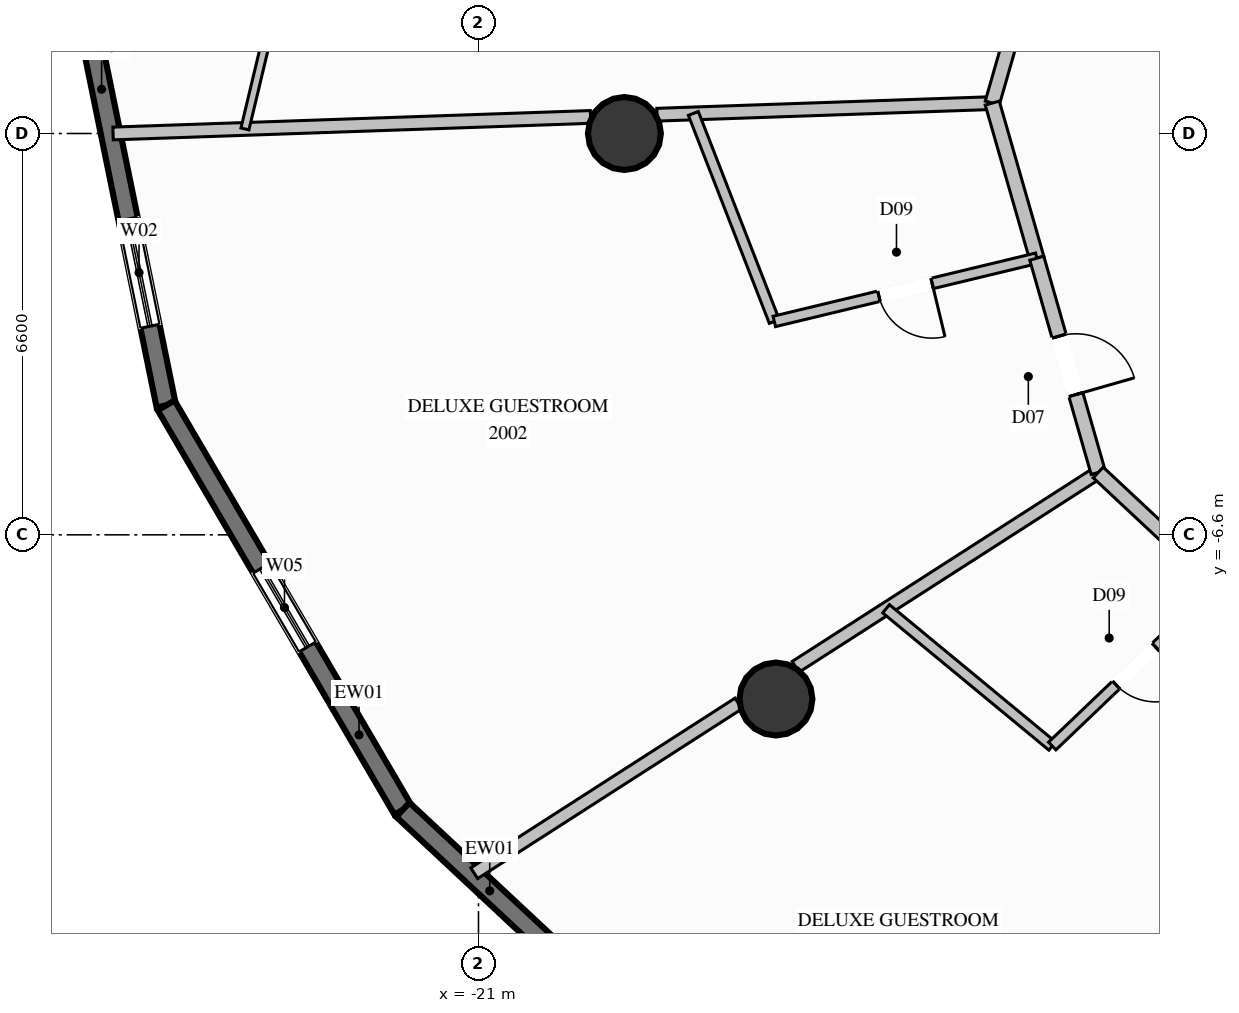
"""IFC4 building model, lengths in metres.
Left out: names, types, materials, properties, quantities, classifications, styles, units other than length and angle.
Written with IfcOpenShell. Run it as: python <this file> out.ifc"""

import sys

from ifc_helpers import new_model, si_unit, direction, frame, frame_2d, origin, origin_2d, place, context, subcontext, project, spatial, rectangle, circle, extrude, element, fill, save


model = new_model("IFC4")
c1 = context("Model", 3, precision=1e-05, world=origin(), true_north=direction((0.0, 1.0)))
c2 = subcontext(c1, "Body", "Model", "MODEL_VIEW")
j1 = project(units=[si_unit("LENGTHUNIT", "METRE"), si_unit("PLANEANGLEUNIT", "RADIAN")], contexts=[c1])
p1 = place(None, origin())
s1 = spatial("IfcSite", under=j1, at=p1, CompositionType="ELEMENT")
p2 = place(p1, origin())
s2 = spatial("IfcBuilding", under=s1, at=p2, CompositionType="ELEMENT")
p3 = place(p2, frame((0.0, 0.0, 75.2)))
s3 = spatial("IfcBuildingStorey", under=s2, at=p3, CompositionType="ELEMENT", Elevation=75.2)
for number, where, z_axis, x_axis in (
    (1, (-18.6, 0.0, 0.0), (0.0, 0.0, 1.0), (1.0, 0.0, 0.0)),
    (2, (-16.108, -9.3, 0.0), (0.0, 0.0, 1.0), (1.0, 0.0, 0.0)),
):
    element("IfcColumn", number, at=place(p3, frame(where, z_axis=z_axis, x_axis=x_axis)), inside=s3, PredefinedType="COLUMN", context=c2, shape_type="SweptSolid", body=[
        extrude(circle(Radius=0.6, at=origin_2d()), origin(), (0.0, 0.0, 1.0), 3.6),
    ])
p4 = place(p3, frame((-26.137, -4.471, 0.0), z_axis=(0.0, 0.0, 1.0), x_axis=(-0.200054576405, 0.979784755168, 0.0)))
e3 = element("IfcWall", 3, at=p4, inside=s3, PredefinedType="SOLIDWALL", context=c2, shape_type="SweptSolid", body=[
    extrude(rectangle(XDim=7.233, YDim=0.32, at=frame_2d((3.617, 0.0))), origin(), (0.0, 0.0, 1.0), 3.34),
])
p5 = place(p4, frame((1.328, 0.0, 0.35)))
e4 = element("IfcOpeningElement", 4, at=p5, cuts=e3, PredefinedType="OPENING", context=c2, shape_type="SweptSolid", body=[
    extrude(rectangle(XDim=1.8, YDim=2.6, at=frame_2d((0.9, 1.3))), frame((0.0, 0.17, 0.0), z_axis=(0.0, -1.0, 0.0), x_axis=(1.0, 0.0, 0.0)), (0.0, 0.0, 1.0), 0.34),
])
p6 = place(p3, frame((-22.244, -11.121, 0.0), z_axis=(0.0, 0.0, 1.0), x_axis=(-0.505207977972, 0.862997623979, 0.0)))
e5 = element("IfcWall", 5, at=p6, inside=s3, PredefinedType="SOLIDWALL", context=c2, shape_type="SweptSolid", body=[
    extrude(rectangle(XDim=7.706, YDim=0.32, at=frame_2d((3.853, 0.0))), origin(), (0.0, 0.0, 1.0), 3.34),
])
p7 = place(p6, frame((3.103, 0.0, 0.85)))
e6 = element("IfcOpeningElement", 6, at=p7, cuts=e5, PredefinedType="OPENING", context=c2, shape_type="SweptSolid", body=[
    extrude(rectangle(XDim=1.5, YDim=1.2, at=frame_2d((0.75, 0.6))), frame((0.0, 0.17, 0.0), z_axis=(0.0, -1.0, 0.0), x_axis=(1.0, 0.0, 0.0)), (0.0, 0.0, 1.0), 0.34),
])
p8 = place(p3, frame((-16.287, -16.682, 0.0), z_axis=(0.0, 0.0, 1.0), x_axis=(-0.730986520917, 0.682391900771, 0.0)))
e7 = element("IfcWall", 7, at=p8, inside=s3, PredefinedType="SOLIDWALL", context=c2, shape_type="SweptSolid", body=[
    extrude(rectangle(XDim=8.149, YDim=0.32, at=frame_2d((4.074, 0.0))), origin(), (0.0, 0.0, 1.0), 3.34),
])
p9 = place(p8, frame((2.489, 0.0, 0.85)))
e8 = element("IfcOpeningElement", 8, at=p9, cuts=e7, PredefinedType="OPENING", context=c2, shape_type="SweptSolid", body=[
    extrude(rectangle(XDim=1.5, YDim=1.2, at=frame_2d((0.75, 0.6))), frame((0.0, 0.17, 0.0), z_axis=(0.0, -1.0, 0.0), x_axis=(1.0, 0.0, 0.0)), (0.0, 0.0, 1.0), 0.34),
])
p10 = place(p3, frame((-12.55, 0.5, 0.0), z_axis=(0.0, 0.0, 1.0), x_axis=(-0.999400889754, -0.034610136654, 0.0)))
e9 = element("IfcWall", 9, at=p10, inside=s3, PredefinedType="PARTITIONING", context=c2, shape_type="SweptSolid", body=[
    extrude(rectangle(XDim=5.516, YDim=0.21, at=frame_2d((2.758, 0.0))), origin(), (0.0, 0.0, 1.0), 2.42),
])
p11 = place(p3, frame((-19.157, 0.272, 0.0), z_axis=(0.0, 0.0, 1.0), x_axis=(-0.999400822075, -0.034612090897, 0.0)))
e10 = element("IfcWall", 10, at=p11, inside=s3, PredefinedType="PARTITIONING", context=c2, shape_type="SweptSolid", body=[
    extrude(rectangle(XDim=7.858, YDim=0.21, at=frame_2d((3.929, 0.0))), origin(), (0.0, 0.0, 1.0), 2.42),
])
p12 = place(p3, frame((-10.808, -5.575, 0.0), z_axis=(0.0, 0.0, 1.0), x_axis=(-0.841434537704, -0.540359064659, 0.0)))
e11 = element("IfcWall", 11, at=p12, inside=s3, PredefinedType="PARTITIONING", context=c2, shape_type="SweptSolid", body=[
    extrude(rectangle(XDim=5.915, YDim=0.21, at=frame_2d((2.957, 0.0))), origin(), (0.0, 0.0, 1.0), 2.709),
])
p13 = place(p3, frame((-16.724, -9.374, 0.0), z_axis=(0.0, 0.0, 1.0), x_axis=(-0.841425650912, -0.540372902714, 0.0)))
e12 = element("IfcWall", 12, at=p13, inside=s3, PredefinedType="PARTITIONING", context=c2, shape_type="SweptSolid", body=[
    extrude(rectangle(XDim=5.165, YDim=0.21, at=frame_2d((2.583, 0.0))), origin(), (0.0, 0.0, 1.0), 3.34),
])
p14 = place(p3, frame((-10.808, 6.575, 0.0), z_axis=(0.0, 0.0, 1.0), x_axis=(-0.275634306148, -0.961262570412, 0.0)))
e13 = element("IfcWall", 13, at=p14, inside=s3, PredefinedType="PARTITIONING", context=c2, shape_type="SweptSolid", body=[
    extrude(rectangle(XDim=6.32, YDim=0.24, at=frame_2d((3.16, 0.0))), origin(), (0.0, 0.0, 1.0), 3.34),
])
p15 = place(p3, frame((-21.831, 12.654, 0.0), z_axis=(0.0, 0.0, 1.0), x_axis=(-0.232716823602, -0.972544538832, 0.0)))
e14 = element("IfcWall", 14, at=p15, inside=s3, PredefinedType="PARTITIONING", context=c2, shape_type="SweptSolid", body=[
    extrude(rectangle(XDim=12.934, YDim=0.135, at=frame_2d((6.467, 0.0))), origin(), (0.0, 0.0, 1.0), 3.34),
])
p16 = place(p15, frame((5.992, 0.0, 0.0)))
e15 = element("IfcOpeningElement", 15, at=p16, cuts=e14, PredefinedType="OPENING", context=c2, shape_type="SweptSolid", body=[
    extrude(rectangle(XDim=0.95, YDim=2.1, at=frame_2d((0.475, 1.05))), frame((0.0, 0.078, 0.0), z_axis=(0.0, -1.0, 0.0), x_axis=(1.0, 0.0, 0.0)), (0.0, 0.0, 1.0), 0.155),
])
p17 = place(p3, frame((-12.55, 0.5, 0.0), z_axis=(0.0, 0.0, 1.0), x_axis=(0.275790140823, -0.961217872402, 0.0)))
e16 = element("IfcWall", 16, at=p17, inside=s3, PredefinedType="PARTITIONING", context=c2, shape_type="SweptSolid", body=[
    extrude(rectangle(XDim=2.654, YDim=0.24, at=frame_2d((1.327, 0.0))), origin(), (0.0, 0.0, 1.0), 3.34),
])
p18 = place(p3, frame((-17.466, 0.33, 0.0), z_axis=(0.0, 0.0, 1.0), x_axis=(0.362590680008, -0.931948495772, 0.0)))
e17 = element("IfcWall", 17, at=p18, inside=s3, PredefinedType="PLUMBINGWALL", context=c2, shape_type="SweptSolid", body=[
    extrude(rectangle(XDim=3.671, YDim=0.175, at=frame_2d((1.835, 0.0))), origin(), (0.0, 0.0, 1.0), 3.34),
])
p19 = place(p3, frame((-11.818, -2.051, 0.0), z_axis=(0.0, 0.0, 1.0), x_axis=(-0.972183308893, -0.234221292607, 0.0)))
e18 = element("IfcWall", 18, at=p19, inside=s3, PredefinedType="PLUMBINGWALL", context=c2, shape_type="SweptSolid", body=[
    extrude(rectangle(XDim=4.44, YDim=0.175, at=frame_2d((2.22, 0.0))), origin(), (0.0, 0.0, 1.0), 3.34),
])
p20 = place(p19, frame((1.77, 0.0, 0.0)))
e19 = element("IfcOpeningElement", 19, at=p20, cuts=e18, PredefinedType="OPENING", context=c2, shape_type="SweptSolid", body=[
    extrude(rectangle(XDim=0.9, YDim=2.1, at=frame_2d((0.45, 1.05))), frame((0.0, 0.098, 0.0), z_axis=(0.0, -1.0, 0.0), x_axis=(1.0, 0.0, 0.0)), (0.0, 0.0, 1.0), 0.195),
])
p21 = place(p3, frame((-11.818, -2.051, 0.0), z_axis=(0.0, 0.0, 1.0), x_axis=(0.275521481409, -0.961294914832, 0.0)))
e20 = element("IfcWall", 20, at=p21, inside=s3, PredefinedType="PARTITIONING", context=c2, shape_type="SweptSolid", body=[
    extrude(rectangle(XDim=3.666, YDim=0.24, at=frame_2d((1.833, 0.0))), origin(), (0.0, 0.0, 1.0), 3.34),
])
p22 = place(p21, frame((1.333, 0.0, 0.0)))
e21 = element("IfcOpeningElement", 21, at=p22, cuts=e20, PredefinedType="OPENING", context=c2, shape_type="SweptSolid", body=[
    extrude(rectangle(XDim=1.0, YDim=2.2, at=frame_2d((0.5, 1.1))), frame((0.0, 0.13, 0.0), z_axis=(0.0, -1.0, 0.0), x_axis=(1.0, 0.0, 0.0)), (0.0, 0.0, 1.0), 0.26),
])
p23 = place(p3, frame((-10.808, -5.575, 0.0), z_axis=(0.0, 0.0, 1.0), x_axis=(0.730449499178, -0.682966711597, 0.0)))
e22 = element("IfcWall", 22, at=p23, inside=s3, PredefinedType="PARTITIONING", context=c2, shape_type="SweptSolid", body=[
    extrude(rectangle(XDim=2.735, YDim=0.24, at=frame_2d((1.368, 0.0))), origin(), (0.0, 0.0, 1.0), 3.34),
])
p24 = place(p3, frame((-14.297, -7.816, 0.0), z_axis=(0.0, 0.0, 1.0), x_axis=(0.771064668328, -0.636756843117, 0.0)))
e23 = element("IfcWall", 23, at=p24, inside=s3, PredefinedType="PLUMBINGWALL", context=c2, shape_type="SweptSolid", body=[
    extrude(rectangle(XDim=3.545, YDim=0.175, at=frame_2d((1.772, 0.0))), origin(), (0.0, 0.0, 1.0), 3.34),
])
p25 = place(p3, frame((-8.81, -7.443, 0.0), z_axis=(0.0, 0.0, 1.0), x_axis=(-0.723204148778, -0.690634316546, 0.0)))
e24 = element("IfcWall", 24, at=p25, inside=s3, PredefinedType="PLUMBINGWALL", context=c2, shape_type="SweptSolid", body=[
    extrude(rectangle(XDim=3.808, YDim=0.175, at=frame_2d((1.904, 0.0))), origin(), (0.0, 0.0, 1.0), 2.709),
])
p26 = place(p25, frame((1.454, 0.0, 0.0)))
e25 = element("IfcOpeningElement", 25, at=p26, cuts=e24, PredefinedType="OPENING", context=c2, shape_type="SweptSolid", body=[
    extrude(rectangle(XDim=0.9, YDim=2.1, at=frame_2d((0.45, 1.05))), frame((0.0, 0.098, 0.0), z_axis=(0.0, -1.0, 0.0), x_axis=(1.0, 0.0, 0.0)), (0.0, 0.0, 1.0), 0.195),
])
p27 = place(p5, origin())
e26 = element("IfcWindow", 26, at=p27, inside=s3, PartitioningType="SINGLE_PANEL", PredefinedType="WINDOW", context=c2, shape_type="SweptSolid", body=[
    extrude(rectangle(XDim=1.8, YDim=2.6, at=frame_2d((0.9, 1.3))), frame((0.0, 0.03, 0.0), z_axis=(0.0, -1.0, 0.0), x_axis=(1.0, 0.0, 0.0)), (0.0, 0.0, 1.0), 0.06),
])
fill(e4, e26)
p28 = place(p7, origin())
e27 = element("IfcWindow", 27, at=p28, inside=s3, PartitioningType="SINGLE_PANEL", PredefinedType="WINDOW", context=c2, shape_type="SweptSolid", body=[
    extrude(rectangle(XDim=1.5, YDim=1.2, at=frame_2d((0.75, 0.6))), frame((0.0, 0.03, 0.0), z_axis=(0.0, -1.0, 0.0), x_axis=(1.0, 0.0, 0.0)), (0.0, 0.0, 1.0), 0.06),
])
fill(e6, e27)
p29 = place(p20, origin())
e28 = element("IfcDoor", 28, at=p29, inside=s3, OperationType="SINGLE_SWING_LEFT", PredefinedType="DOOR", context=c2, shape_type="SweptSolid", body=[
    extrude(rectangle(XDim=0.9, YDim=2.1, at=frame_2d((0.45, 1.05))), frame((0.0, 0.025, 0.0), z_axis=(0.0, -1.0, 0.0), x_axis=(1.0, 0.0, 0.0)), (0.0, 0.0, 1.0), 0.05),
])
fill(e19, e28)
p30 = place(p22, origin())
e29 = element("IfcDoor", 29, at=p30, inside=s3, OperationType="SINGLE_SWING_RIGHT", PredefinedType="DOOR", context=c2, shape_type="SweptSolid", body=[
    extrude(rectangle(XDim=1.0, YDim=2.2, at=frame_2d((0.5, 1.1))), frame((0.0, 0.025, 0.0), z_axis=(0.0, -1.0, 0.0), x_axis=(1.0, 0.0, 0.0)), (0.0, 0.0, 1.0), 0.05),
])
fill(e21, e29)
p31 = place(p26, origin())
e30 = element("IfcDoor", 30, at=p31, inside=s3, OperationType="SINGLE_SWING_LEFT", PredefinedType="DOOR", context=c2, shape_type="SweptSolid", body=[
    extrude(rectangle(XDim=0.9, YDim=2.1, at=frame_2d((0.45, 1.05))), frame((0.0, 0.025, 0.0), z_axis=(0.0, -1.0, 0.0), x_axis=(1.0, 0.0, 0.0)), (0.0, 0.0, 1.0), 0.05),
])
fill(e25, e30)
save(model, sys.argv[1])
